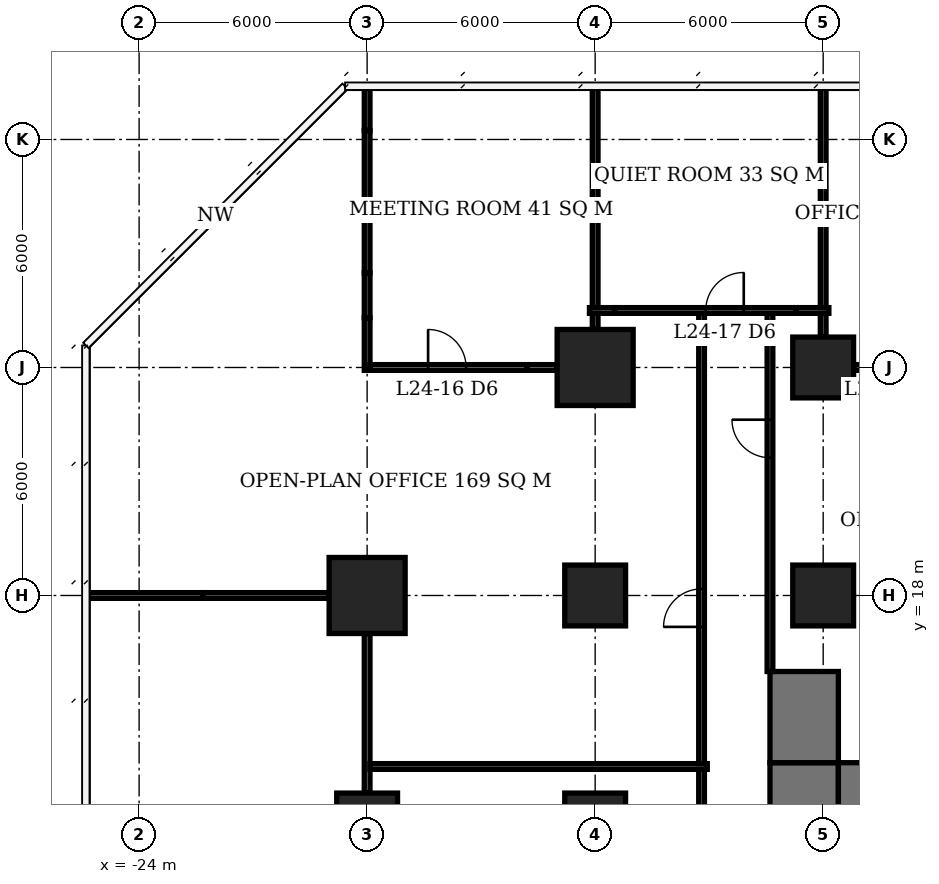
"""IFC4 building model, lengths in metres.
Left out: names, types, materials, properties, quantities, classifications, styles, units other than length and angle.
Written with IfcOpenShell. Run it as: python <this file> out.ifc"""

import sys

from ifc_helpers import new_model, si_unit, direction, frame, frame_2d, origin, origin_2d, place, context, subcontext, project, spatial, rectangle, extrude, element, fill, save


model = new_model("IFC4")
c1 = context("Model", 3, precision=1e-05, world=origin(), true_north=direction((0.0, 1.0)))
c2 = subcontext(c1, "Body", "Model", "MODEL_VIEW")
j1 = project(units=[si_unit("LENGTHUNIT", "METRE"), si_unit("PLANEANGLEUNIT", "RADIAN")], contexts=[c1])
p1 = place(None, origin())
s1 = spatial("IfcSite", under=j1, at=p1, CompositionType="ELEMENT")
p2 = place(p1, origin())
s2 = spatial("IfcBuilding", under=s1, at=p2, CompositionType="ELEMENT")
p3 = place(p2, frame((0.0, 0.0, 101.6)))
s3 = spatial("IfcBuildingStorey", under=s2, at=p3, CompositionType="ELEMENT", Elevation=101.6)
p4 = place(p3, frame((-18.0, 12.0, 0.0), z_axis=(0.0, 0.0, 1.0), x_axis=(1.0, 0.0, 0.0)))
e1 = element("IfcColumn", 1, at=p4, inside=s3, PredefinedType="COLUMN", context=c2, shape_type="SweptSolid", body=[
    extrude(rectangle(XDim=1.6, YDim=1.6, at=origin_2d()), origin(), (0.0, 0.0, 1.0), 3.9),
])
p5 = place(p3, frame((-18.0, 18.0, 0.0), z_axis=(0.0, 0.0, 1.0), x_axis=(1.0, 0.0, 0.0)))
e2 = element("IfcColumn", 2, at=p5, inside=s3, PredefinedType="COLUMN", context=c2, shape_type="SweptSolid", body=[
    extrude(rectangle(XDim=2.0, YDim=2.0, at=origin_2d()), origin(), (0.0, 0.0, 1.0), 3.9),
])
for number, where, z_axis, x_axis in (
    (3, (-12.0, 12.0, 0.0), (0.0, 0.0, 1.0), (1.0, 0.0, 0.0)),
    (4, (-12.0, 18.0, 0.0), (0.0, 0.0, 1.0), (1.0, 0.0, 0.0)),
):
    element("IfcColumn", number, at=place(p3, frame(where, z_axis=z_axis, x_axis=x_axis)), inside=s3, PredefinedType="COLUMN", context=c2, shape_type="SweptSolid", body=[
        extrude(rectangle(XDim=1.6, YDim=1.6, at=origin_2d()), origin(), (0.0, 0.0, 1.0), 3.9),
    ])
p6 = place(p3, frame((-12.0, 24.0, 0.0), z_axis=(0.0, 0.0, 1.0), x_axis=(1.0, 0.0, 0.0)))
e5 = element("IfcColumn", 5, at=p6, inside=s3, PredefinedType="COLUMN", context=c2, shape_type="SweptSolid", body=[
    extrude(rectangle(XDim=2.0, YDim=2.0, at=origin_2d()), origin(), (0.0, 0.0, 1.0), 3.9),
])
for number, where, z_axis, x_axis in (
    (6, (-6.0, 18.0, 0.0), (0.0, 0.0, 1.0), (1.0, 0.0, 0.0)),
    (7, (-6.0, 24.0, 0.0), (0.0, 0.0, 1.0), (1.0, 0.0, 0.0)),
):
    element("IfcColumn", number, at=place(p3, frame(where, z_axis=z_axis, x_axis=x_axis)), inside=s3, PredefinedType="COLUMN", context=c2, shape_type="SweptSolid", body=[
        extrude(rectangle(XDim=1.6, YDim=1.6, at=origin_2d()), origin(), (0.0, 0.0, 1.0), 3.9),
    ])
p7 = place(p3, frame((-5.6, 12.6, 0.0), z_axis=(0.0, 0.0, 1.0), x_axis=(1.0, 0.0, 0.0)))
e8 = element("IfcWall", 8, at=p7, inside=s3, PredefinedType="SHEAR", context=c2, shape_type="SweptSolid", body=[
    extrude(rectangle(XDim=23.2, YDim=2.0, at=frame_2d((11.6, 0.0))), origin(), (0.0, 0.0, 1.0), 3.9),
])
p8 = place(p3, frame((-6.5, -7.6, 0.0), z_axis=(0.0, 0.0, 1.0), x_axis=(0.0, 1.0, 0.0)))
e9 = element("IfcWall", 9, at=p8, inside=s3, PredefinedType="SHEAR", context=c2, shape_type="SweptSolid", body=[
    extrude(rectangle(XDim=21.2, YDim=1.8, at=frame_2d((10.6, 0.0))), origin(), (0.0, 0.0, 1.0), 3.9),
])
p9 = place(p8, frame((7.8, 0.0, 0.0)))
e10 = element("IfcOpeningElement", 10, at=p9, cuts=e9, PredefinedType="OPENING", context=c2, shape_type="SweptSolid", body=[
    extrude(rectangle(XDim=1.8, YDim=2.4, at=frame_2d((0.9, 1.2))), frame((0.0, 0.91, 0.0), z_axis=(0.0, -1.0, 0.0), x_axis=(1.0, 0.0, 0.0)), (0.0, 0.0, 1.0), 1.82),
])
p10 = place(p3, frame((-6.5, 13.6, 0.0), z_axis=(0.0, 0.0, 1.0), x_axis=(0.0, 1.0, 0.0)))
e11 = element("IfcWall", 11, at=p10, inside=s3, PredefinedType="SHEAR", context=c2, shape_type="SweptSolid", body=[
    extrude(rectangle(XDim=2.4, YDim=1.8, at=frame_2d((1.2, 0.0))), origin(), (0.0, 0.0, 1.0), 3.9),
])
p11 = place(p3, frame((-25.4, 18.0, 0.0), z_axis=(0.0, 0.0, 1.0), x_axis=(1.0, 0.0, 0.0)))
e12 = element("IfcWall", 12, at=p11, inside=s3, PredefinedType="PARTITIONING", context=c2, shape_type="SweptSolid", body=[
    extrude(rectangle(XDim=3.09, YDim=0.15, at=frame_2d((1.545, 0.0))), origin(), (0.0, 0.0, 1.0), 3.65),
])
p12 = place(p3, frame((-22.31, 18.0, 0.0), z_axis=(0.0, 0.0, 1.0), x_axis=(1.0, 0.0, 0.0)))
e13 = element("IfcWall", 13, at=p12, inside=s3, PredefinedType="PARTITIONING", context=c2, shape_type="SweptSolid", body=[
    extrude(rectangle(XDim=3.31, YDim=0.15, at=frame_2d((1.655, 0.0))), origin(), (0.0, 0.0, 1.0), 2.65),
])
p13 = place(p3, frame((-17.925, 24.0, 0.0), z_axis=(0.0, 0.0, 1.0), x_axis=(1.0, 0.0, 0.0)))
e14 = element("IfcWall", 14, at=p13, inside=s3, PredefinedType="PARTITIONING", context=c2, shape_type="SweptSolid", body=[
    extrude(rectangle(XDim=4.133, YDim=0.15, at=frame_2d((2.066, 0.0))), origin(), (0.0, 0.0, 1.0), 3.65),
])
p14 = place(p13, frame((1.529, 0.0, 0.0)))
e15 = element("IfcOpeningElement", 15, at=p14, cuts=e14, PredefinedType="OPENING", context=c2, shape_type="SweptSolid", body=[
    extrude(rectangle(XDim=1.0, YDim=2.1, at=frame_2d((0.5, 1.05))), frame((0.0, 0.085, 0.0), z_axis=(0.0, -1.0, 0.0), x_axis=(1.0, 0.0, 0.0)), (0.0, 0.0, 1.0), 0.17),
])
p15 = place(p3, frame((-13.792, 24.0, 0.0), z_axis=(0.0, 0.0, 1.0), x_axis=(1.0, 0.0, 0.0)))
e16 = element("IfcWall", 16, at=p15, inside=s3, PredefinedType="PARTITIONING", context=c2, shape_type="SweptSolid", body=[
    extrude(rectangle(XDim=0.792, YDim=0.15, at=frame_2d((0.396, 0.0))), origin(), (0.0, 0.0, 1.0), 2.65),
])
p16 = place(p3, frame((-5.2, 24.0, 0.0), z_axis=(0.0, 0.0, 1.0), x_axis=(1.0, 0.0, 0.0)))
e17 = element("IfcWall", 17, at=p16, inside=s3, PredefinedType="PARTITIONING", context=c2, shape_type="SweptSolid", body=[
    extrude(rectangle(XDim=2.125, YDim=0.15, at=frame_2d((1.062, 0.0))), origin(), (0.0, 0.0, 1.0), 3.65),
])
p17 = place(p16, frame((0.6, 0.0, 0.0)))
e18 = element("IfcOpeningElement", 18, at=p17, cuts=e17, PredefinedType="OPENING", context=c2, shape_type="SweptSolid", body=[
    extrude(rectangle(XDim=1.0, YDim=2.1, at=frame_2d((0.5, 1.05))), frame((0.0, 0.085, 0.0), z_axis=(0.0, -1.0, 0.0), x_axis=(1.0, 0.0, 0.0)), (0.0, 0.0, 1.0), 0.17),
])
p18 = place(p3, frame((-12.15, 25.5, 0.0), z_axis=(0.0, 0.0, 1.0), x_axis=(1.0, 0.0, 0.0)))
e19 = element("IfcWall", 19, at=p18, inside=s3, PredefinedType="PARTITIONING", context=c2, shape_type="SweptSolid", body=[
    extrude(rectangle(XDim=0.66, YDim=0.15, at=frame_2d((0.33, 0.0))), origin(), (0.0, 0.0, 1.0), 2.65),
])
p19 = place(p3, frame((-11.49, 25.5, 0.0), z_axis=(0.0, 0.0, 1.0), x_axis=(1.0, 0.0, 0.0)))
e20 = element("IfcWall", 20, at=p19, inside=s3, PredefinedType="PARTITIONING", context=c2, shape_type="SweptSolid", body=[
    extrude(rectangle(XDim=4.78, YDim=0.15, at=frame_2d((2.39, 0.0))), origin(), (0.0, 0.0, 1.0), 3.65),
])
p20 = place(p19, frame((2.4, 0.0, 0.0)))
e21 = element("IfcOpeningElement", 21, at=p20, cuts=e20, PredefinedType="OPENING", context=c2, shape_type="SweptSolid", body=[
    extrude(rectangle(XDim=1.0, YDim=2.1, at=frame_2d((0.5, 1.05))), frame((0.0, 0.085, 0.0), z_axis=(0.0, -1.0, 0.0), x_axis=(1.0, 0.0, 0.0)), (0.0, 0.0, 1.0), 0.17),
])
p21 = place(p3, frame((-6.71, 25.5, 0.0), z_axis=(0.0, 0.0, 1.0), x_axis=(1.0, 0.0, 0.0)))
e22 = element("IfcWall", 22, at=p21, inside=s3, PredefinedType="PARTITIONING", context=c2, shape_type="SweptSolid", body=[
    extrude(rectangle(XDim=0.86, YDim=0.15, at=frame_2d((0.43, 0.0))), origin(), (0.0, 0.0, 1.0), 2.65),
])
p22 = place(p3, frame((-18.0, 12.8, 0.0), z_axis=(0.0, 0.0, 1.0), x_axis=(0.0, 1.0, 0.0)))
e23 = element("IfcWall", 23, at=p22, inside=s3, PredefinedType="PARTITIONING", context=c2, shape_type="SweptSolid", body=[
    extrude(rectangle(XDim=4.2, YDim=0.15, at=frame_2d((2.1, 0.0))), origin(), (0.0, 0.0, 1.0), 3.65),
])
p23 = place(p3, frame((-18.0, 23.925, 0.0), z_axis=(0.0, 0.0, 1.0), x_axis=(0.0, 1.0, 0.0)))
e24 = element("IfcWall", 24, at=p23, inside=s3, PredefinedType="PARTITIONING", context=c2, shape_type="SweptSolid", body=[
    extrude(rectangle(XDim=1.385, YDim=0.15, at=frame_2d((0.692, 0.0))), origin(), (0.0, 0.0, 1.0), 3.65),
])
p24 = place(p3, frame((-18.0, 25.31, 0.0), z_axis=(0.0, 0.0, 1.0), x_axis=(0.0, 1.0, 0.0)))
e25 = element("IfcWall", 25, at=p24, inside=s3, PredefinedType="PARTITIONING", context=c2, shape_type="SweptSolid", body=[
    extrude(rectangle(XDim=1.18, YDim=0.15, at=frame_2d((0.59, 0.0))), origin(), (0.0, 0.0, 1.0), 2.65),
])
p25 = place(p3, frame((-18.0, 26.49, 0.0), z_axis=(0.0, 0.0, 1.0), x_axis=(0.0, 1.0, 0.0)))
e26 = element("IfcWall", 26, at=p25, inside=s3, PredefinedType="PARTITIONING", context=c2, shape_type="SweptSolid", body=[
    extrude(rectangle(XDim=1.718, YDim=0.15, at=frame_2d((0.859, 0.0))), origin(), (0.0, 0.0, 1.0), 3.65),
])
p26 = place(p3, frame((-18.0, 28.208, 0.0), z_axis=(0.0, 0.0, 1.0), x_axis=(0.0, 1.0, 0.0)))
e27 = element("IfcWall", 27, at=p26, inside=s3, PredefinedType="PARTITIONING", context=c2, shape_type="SweptSolid", body=[
    extrude(rectangle(XDim=2.029, YDim=0.15, at=frame_2d((1.015, 0.0))), origin(), (0.0, 0.0, 1.0), 2.65),
])
p27 = place(p3, frame((-18.0, 30.237, 0.0), z_axis=(0.0, 0.0, 1.0), x_axis=(0.0, 1.0, 0.0)))
e28 = element("IfcWall", 28, at=p27, inside=s3, PredefinedType="PARTITIONING", context=c2, shape_type="SweptSolid", body=[
    extrude(rectangle(XDim=1.163, YDim=0.15, at=frame_2d((0.582, 0.0))), origin(), (0.0, 0.0, 1.0), 3.65),
])
p28 = place(p3, frame((-12.0, 25.0, 0.0), z_axis=(0.0, 0.0, 1.0), x_axis=(0.0, 1.0, 0.0)))
e29 = element("IfcWall", 29, at=p28, inside=s3, PredefinedType="PARTITIONING", context=c2, shape_type="SweptSolid", body=[
    extrude(rectangle(XDim=0.425, YDim=0.15, at=frame_2d((0.212, 0.0))), origin(), (0.0, 0.0, 1.0), 2.65),
])
p29 = place(p3, frame((-12.0, 25.575, 0.0), z_axis=(0.0, 0.0, 1.0), x_axis=(0.0, 1.0, 0.0)))
e30 = element("IfcWall", 30, at=p29, inside=s3, PredefinedType="PARTITIONING", context=c2, shape_type="SweptSolid", body=[
    extrude(rectangle(XDim=2.735, YDim=0.15, at=frame_2d((1.368, 0.0))), origin(), (0.0, 0.0, 1.0), 2.65),
])
p30 = place(p3, frame((-12.0, 28.31, 0.0), z_axis=(0.0, 0.0, 1.0), x_axis=(0.0, 1.0, 0.0)))
e31 = element("IfcWall", 31, at=p30, inside=s3, PredefinedType="PARTITIONING", context=c2, shape_type="SweptSolid", body=[
    extrude(rectangle(XDim=3.09, YDim=0.15, at=frame_2d((1.545, 0.0))), origin(), (0.0, 0.0, 1.0), 3.65),
])
p31 = place(p3, frame((-6.0, 24.8, 0.0), z_axis=(0.0, 0.0, 1.0), x_axis=(0.0, 1.0, 0.0)))
e32 = element("IfcWall", 32, at=p31, inside=s3, PredefinedType="PARTITIONING", context=c2, shape_type="SweptSolid", body=[
    extrude(rectangle(XDim=0.625, YDim=0.15, at=frame_2d((0.312, 0.0))), origin(), (0.0, 0.0, 1.0), 2.65),
])
p32 = place(p3, frame((-6.0, 25.575, 0.0), z_axis=(0.0, 0.0, 1.0), x_axis=(0.0, 1.0, 0.0)))
e33 = element("IfcWall", 33, at=p32, inside=s3, PredefinedType="PARTITIONING", context=c2, shape_type="SweptSolid", body=[
    extrude(rectangle(XDim=2.735, YDim=0.15, at=frame_2d((1.368, 0.0))), origin(), (0.0, 0.0, 1.0), 2.65),
])
p33 = place(p3, frame((-6.0, 28.31, 0.0), z_axis=(0.0, 0.0, 1.0), x_axis=(0.0, 1.0, 0.0)))
e34 = element("IfcWall", 34, at=p33, inside=s3, PredefinedType="PARTITIONING", context=c2, shape_type="SweptSolid", body=[
    extrude(rectangle(XDim=3.09, YDim=0.15, at=frame_2d((1.545, 0.0))), origin(), (0.0, 0.0, 1.0), 3.65),
])
p34 = place(p3, frame((-17.925, 13.5, 0.0), z_axis=(0.0, 0.0, 1.0), x_axis=(1.0, 0.0, 0.0)))
e35 = element("IfcWall", 35, at=p34, inside=s3, PredefinedType="PARTITIONING", context=c2, shape_type="SweptSolid", body=[
    extrude(rectangle(XDim=8.875, YDim=0.15, at=frame_2d((4.438, 0.0))), origin(), (0.0, 0.0, 1.0), 3.65),
])
p35 = place(p3, frame((-9.2, 4.575, 0.0), z_axis=(0.0, 0.0, 1.0), x_axis=(0.0, 1.0, 0.0)))
e36 = element("IfcWall", 36, at=p35, inside=s3, PredefinedType="PARTITIONING", context=c2, shape_type="SweptSolid", body=[
    extrude(rectangle(XDim=8.85, YDim=0.15, at=frame_2d((4.425, 0.0))), origin(), (0.0, 0.0, 1.0), 3.65),
])
p36 = place(p35, frame((2.575, 0.0, 0.0)))
e37 = element("IfcOpeningElement", 37, at=p36, cuts=e36, PredefinedType="OPENING", context=c2, shape_type="SweptSolid", body=[
    extrude(rectangle(XDim=1.0, YDim=2.1, at=frame_2d((0.5, 1.05))), frame((0.0, 0.085, 0.0), z_axis=(0.0, -1.0, 0.0), x_axis=(1.0, 0.0, 0.0)), (0.0, 0.0, 1.0), 0.17),
])
p37 = place(p3, frame((-9.2, 13.575, 0.0), z_axis=(0.0, 0.0, 1.0), x_axis=(0.0, 1.0, 0.0)))
e38 = element("IfcWall", 38, at=p37, inside=s3, PredefinedType="PARTITIONING", context=c2, shape_type="SweptSolid", body=[
    extrude(rectangle(XDim=11.85, YDim=0.15, at=frame_2d((5.925, 0.0))), origin(), (0.0, 0.0, 1.0), 3.65),
])
p38 = place(p37, frame((3.599, 0.0, 0.0)))
e39 = element("IfcOpeningElement", 39, at=p38, cuts=e38, PredefinedType="OPENING", context=c2, shape_type="SweptSolid", body=[
    extrude(rectangle(XDim=1.0, YDim=2.1, at=frame_2d((0.5, 1.05))), frame((0.0, 0.085, 0.0), z_axis=(0.0, -1.0, 0.0), x_axis=(1.0, 0.0, 0.0)), (0.0, 0.0, 1.0), 0.17),
])
p39 = place(p3, frame((-7.4, 16.0, 0.0), z_axis=(0.0, 0.0, 1.0), x_axis=(0.0, 1.0, 0.0)))
e40 = element("IfcWall", 40, at=p39, inside=s3, PredefinedType="PARTITIONING", context=c2, shape_type="SweptSolid", body=[
    extrude(rectangle(XDim=9.425, YDim=0.15, at=frame_2d((4.712, 0.0))), origin(), (0.0, 0.0, 1.0), 3.65),
])
p40 = place(p39, frame((5.626, 0.0, 0.0)))
e41 = element("IfcOpeningElement", 41, at=p40, cuts=e40, PredefinedType="OPENING", context=c2, shape_type="SweptSolid", body=[
    extrude(rectangle(XDim=1.0, YDim=2.1, at=frame_2d((0.5, 1.05))), frame((0.0, 0.085, 0.0), z_axis=(0.0, -1.0, 0.0), x_axis=(1.0, 0.0, 0.0)), (0.0, 0.0, 1.0), 0.17),
])
p41 = place(p14, origin())
e42 = element("IfcDoor", 42, at=p41, inside=s3, OperationType="SINGLE_SWING_LEFT", PredefinedType="DOOR", context=c2, shape_type="SweptSolid", body=[
    extrude(rectangle(XDim=1.0, YDim=2.1, at=frame_2d((0.5, 1.05))), frame((0.0, 0.025, 0.0), z_axis=(0.0, -1.0, 0.0), x_axis=(1.0, 0.0, 0.0)), (0.0, 0.0, 1.0), 0.05),
])
fill(e15, e42)
p42 = place(p20, origin())
e43 = element("IfcDoor", 43, at=p42, inside=s3, OperationType="SINGLE_SWING_RIGHT", PredefinedType="DOOR", context=c2, shape_type="SweptSolid", body=[
    extrude(rectangle(XDim=1.0, YDim=2.1, at=frame_2d((0.5, 1.05))), frame((0.0, 0.025, 0.0), z_axis=(0.0, -1.0, 0.0), x_axis=(1.0, 0.0, 0.0)), (0.0, 0.0, 1.0), 0.05),
])
fill(e21, e43)
p43 = place(p40, origin())
e44 = element("IfcDoor", 44, at=p43, inside=s3, OperationType="SINGLE_SWING_RIGHT", PredefinedType="DOOR", context=c2, shape_type="SweptSolid", body=[
    extrude(rectangle(XDim=1.0, YDim=2.1, at=frame_2d((0.5, 1.05))), frame((0.0, 0.025, 0.0), z_axis=(0.0, -1.0, 0.0), x_axis=(1.0, 0.0, 0.0)), (0.0, 0.0, 1.0), 0.05),
])
fill(e41, e44)
p44 = place(p38, origin())
e45 = element("IfcDoor", 45, at=p44, inside=s3, OperationType="SINGLE_SWING_LEFT", PredefinedType="DOOR", context=c2, shape_type="SweptSolid", body=[
    extrude(rectangle(XDim=1.0, YDim=2.1, at=frame_2d((0.5, 1.05))), frame((0.0, 0.025, 0.0), z_axis=(0.0, -1.0, 0.0), x_axis=(1.0, 0.0, 0.0)), (0.0, 0.0, 1.0), 0.05),
])
fill(e39, e45)
save(model, sys.argv[1])
